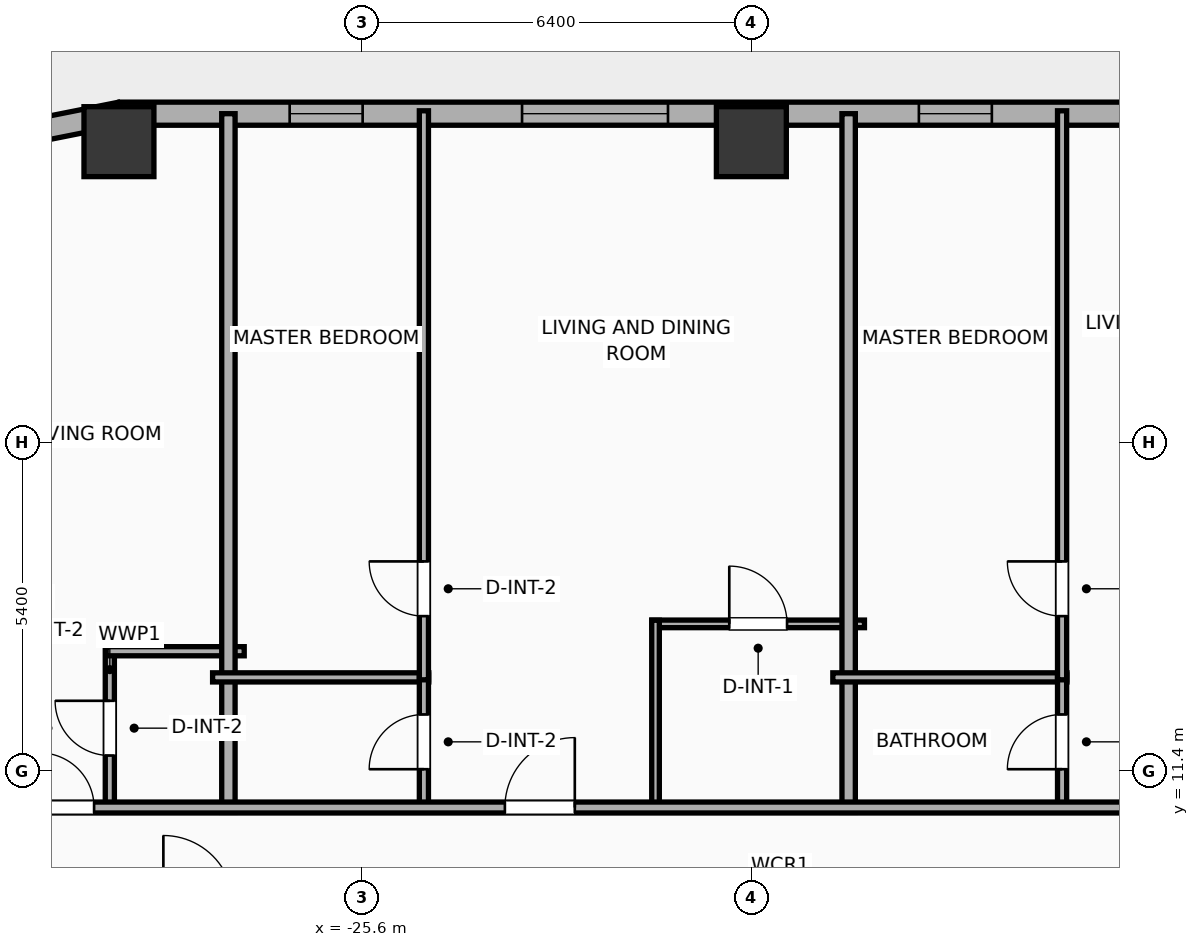
"""IFC4 building model, lengths in metres.
Left out: names, types, materials, properties, quantities, classifications, styles, units other than length and angle.
Written with IfcOpenShell. Run it as: python <this file> out.ifc"""

import sys

from ifc_helpers import new_model, si_unit, direction, frame, frame_2d, origin, origin_2d, place, context, subcontext, project, spatial, rectangle, hollow_rectangle, extrude, element, fill, save


model = new_model("IFC4")
c1 = context("Model", 3, precision=1e-05, world=origin(), true_north=direction((0.0, 1.0)))
c2 = subcontext(c1, "Body", "Model", "MODEL_VIEW")
j1 = project(units=[si_unit("LENGTHUNIT", "METRE"), si_unit("PLANEANGLEUNIT", "RADIAN")], contexts=[c1])
p1 = place(None, origin())
s1 = spatial("IfcSite", under=j1, at=p1, CompositionType="ELEMENT")
p2 = place(p1, origin())
s2 = spatial("IfcBuilding", under=s1, at=p2, CompositionType="ELEMENT")
p3 = place(p2, frame((0.0, 0.0, 53.3)))
s3 = spatial("IfcBuildingStorey", under=s2, at=p3, CompositionType="ELEMENT", Elevation=53.3)
for number, where, z_axis, x_axis in (
    (1, (-19.2, 21.75, 0.0), (0.0, 0.0, 1.0), (1.0, 0.0, 0.0)),
    (2, (-29.6, 21.75, 0.0), (0.0, 0.0, 1.0), (1.0, 0.0, 0.0)),
):
    element("IfcColumn", number, at=place(p3, frame(where, z_axis=z_axis, x_axis=x_axis)), inside=s3, PredefinedType="COLUMN", context=c2, shape_type="SweptSolid", body=[
        extrude(hollow_rectangle(XDim=1.15, YDim=1.15, WallThickness=0.04, at=origin_2d()), origin(), (0.0, 0.0, 1.0), 3.9),
    ])
p4 = place(p3, frame((-31.057, 21.917, 0.0), z_axis=(0.0, 0.0, 1.0), x_axis=(0.980786132421, 0.195086038585, 0.0)))
e3 = element("IfcWall", 3, at=p4, inside=s3, PredefinedType="ELEMENTEDWALL", context=c2, shape_type="SweptSolid", body=[
    extrude(rectangle(XDim=1.504, YDim=0.38, at=frame_2d((0.752, 0.0))), origin(), (0.0, 0.0, 1.0), 3.65),
])
p5 = place(p3, frame((-29.581, 22.21, 0.0), z_axis=(0.0, 0.0, 1.0), x_axis=(1.0, 0.0, 0.0)))
e4 = element("IfcWall", 4, at=p5, inside=s3, PredefinedType="ELEMENTEDWALL", context=c2, shape_type="SweptSolid", body=[
    extrude(rectangle(XDim=51.963, YDim=0.38, at=frame_2d((25.981, 0.0))), origin(), (0.0, 0.0, 1.0), 3.65),
])
p6 = place(p5, frame((6.61, 0.0, 0.75)))
e5 = element("IfcOpeningElement", 5, at=p6, cuts=e4, PredefinedType="OPENING", context=c2, shape_type="SweptSolid", body=[
    extrude(rectangle(XDim=2.4, YDim=2.1, at=frame_2d((1.2, 1.05))), frame((0.0, 0.2, 0.0), z_axis=(0.0, -1.0, 0.0), x_axis=(1.0, 0.0, 0.0)), (0.0, 0.0, 1.0), 0.4),
])
p7 = place(p5, frame((26.431, 0.0, 0.75)))
e6 = element("IfcOpeningElement", 6, at=p7, cuts=e4, PredefinedType="OPENING", context=c2, shape_type="SweptSolid", body=[
    extrude(rectangle(XDim=2.4, YDim=2.1, at=frame_2d((1.2, 1.05))), frame((0.0, 0.2, 0.0), z_axis=(0.0, -1.0, 0.0), x_axis=(1.0, 0.0, 0.0)), (0.0, 0.0, 1.0), 0.4),
])
p8 = place(p5, frame((43.752, 0.0, 0.75)))
e7 = element("IfcOpeningElement", 7, at=p8, cuts=e4, PredefinedType="OPENING", context=c2, shape_type="SweptSolid", body=[
    extrude(rectangle(XDim=2.4, YDim=2.1, at=frame_2d((1.2, 1.05))), frame((0.0, 0.2, 0.0), z_axis=(0.0, -1.0, 0.0), x_axis=(1.0, 0.0, 0.0)), (0.0, 0.0, 1.0), 0.4),
])
p9 = place(p5, frame((2.789, 0.0, 0.75)))
e8 = element("IfcOpeningElement", 8, at=p9, cuts=e4, PredefinedType="OPENING", context=c2, shape_type="SweptSolid", body=[
    extrude(rectangle(XDim=1.2, YDim=2.05, at=frame_2d((0.6, 1.025))), frame((0.0, 0.2, 0.0), z_axis=(0.0, -1.0, 0.0), x_axis=(1.0, 0.0, 0.0)), (0.0, 0.0, 1.0), 0.4),
])
p10 = place(p5, frame((16.831, 0.0, 0.75)))
e9 = element("IfcOpeningElement", 9, at=p10, cuts=e4, PredefinedType="OPENING", context=c2, shape_type="SweptSolid", body=[
    extrude(rectangle(XDim=1.2, YDim=2.05, at=frame_2d((0.6, 1.025))), frame((0.0, 0.2, 0.0), z_axis=(0.0, -1.0, 0.0), x_axis=(1.0, 0.0, 0.0)), (0.0, 0.0, 1.0), 0.4),
])
p11 = place(p5, frame((13.136, 0.0, 0.75)))
e10 = element("IfcOpeningElement", 10, at=p11, cuts=e4, PredefinedType="OPENING", context=c2, shape_type="SweptSolid", body=[
    extrude(rectangle(XDim=1.2, YDim=2.05, at=frame_2d((0.6, 1.025))), frame((0.0, 0.2, 0.0), z_axis=(0.0, -1.0, 0.0), x_axis=(1.0, 0.0, 0.0)), (0.0, 0.0, 1.0), 0.4),
])
p12 = place(p5, frame((21.456, 0.0, 0.75)))
e11 = element("IfcOpeningElement", 11, at=p12, cuts=e4, PredefinedType="OPENING", context=c2, shape_type="SweptSolid", body=[
    extrude(rectangle(XDim=0.52, YDim=2.05, at=frame_2d((0.26, 1.025))), frame((0.0, 0.2, 0.0), z_axis=(0.0, -1.0, 0.0), x_axis=(1.0, 0.0, 0.0)), (0.0, 0.0, 1.0), 0.4),
])
p13 = place(p5, frame((23.507, 0.0, 0.75)))
e12 = element("IfcOpeningElement", 12, at=p13, cuts=e4, PredefinedType="OPENING", context=c2, shape_type="SweptSolid", body=[
    extrude(rectangle(XDim=1.2, YDim=2.05, at=frame_2d((0.6, 1.025))), frame((0.0, 0.2, 0.0), z_axis=(0.0, -1.0, 0.0), x_axis=(1.0, 0.0, 0.0)), (0.0, 0.0, 1.0), 0.4),
])
p14 = place(p5, frame((37.494, 0.0, 0.75)))
e13 = element("IfcOpeningElement", 13, at=p14, cuts=e4, PredefinedType="OPENING", context=c2, shape_type="SweptSolid", body=[
    extrude(rectangle(XDim=1.2, YDim=2.05, at=frame_2d((0.6, 1.025))), frame((0.0, 0.2, 0.0), z_axis=(0.0, -1.0, 0.0), x_axis=(1.0, 0.0, 0.0)), (0.0, 0.0, 1.0), 0.4),
])
p15 = place(p5, frame((33.733, 0.0, 0.75)))
e14 = element("IfcOpeningElement", 14, at=p15, cuts=e4, PredefinedType="OPENING", context=c2, shape_type="SweptSolid", body=[
    extrude(rectangle(XDim=1.2, YDim=2.05, at=frame_2d((0.6, 1.025))), frame((0.0, 0.2, 0.0), z_axis=(0.0, -1.0, 0.0), x_axis=(1.0, 0.0, 0.0)), (0.0, 0.0, 1.0), 0.4),
])
p16 = place(p5, frame((42.323, 0.0, 0.75)))
e15 = element("IfcOpeningElement", 15, at=p16, cuts=e4, PredefinedType="OPENING", context=c2, shape_type="SweptSolid", body=[
    extrude(rectangle(XDim=0.52, YDim=2.05, at=frame_2d((0.26, 1.025))), frame((0.0, 0.2, 0.0), z_axis=(0.0, -1.0, 0.0), x_axis=(1.0, 0.0, 0.0)), (0.0, 0.0, 1.0), 0.4),
])
p17 = place(p5, frame((47.601, 0.0, 0.75)))
e16 = element("IfcOpeningElement", 16, at=p17, cuts=e4, PredefinedType="OPENING", context=c2, shape_type="SweptSolid", body=[
    extrude(rectangle(XDim=1.2, YDim=2.05, at=frame_2d((0.6, 1.025))), frame((0.0, 0.2, 0.0), z_axis=(0.0, -1.0, 0.0), x_axis=(1.0, 0.0, 0.0)), (0.0, 0.0, 1.0), 0.4),
])
p18 = place(p5, frame((49.681, 0.0, 0.75)))
e17 = element("IfcOpeningElement", 17, at=p18, cuts=e4, PredefinedType="OPENING", context=c2, shape_type="SweptSolid", body=[
    extrude(rectangle(XDim=1.2, YDim=2.05, at=frame_2d((0.6, 1.025))), frame((0.0, 0.2, 0.0), z_axis=(0.0, -1.0, 0.0), x_axis=(1.0, 0.0, 0.0)), (0.0, 0.0, 1.0), 0.4),
])
p19 = place(p3, frame((-29.75, 10.78, 0.0), z_axis=(0.0, 0.0, 1.0), x_axis=(0.0, 1.0, 0.0)))
e18 = element("IfcWall", 18, at=p19, inside=s3, PredefinedType="PLUMBINGWALL", context=c2, shape_type="SweptSolid", body=[
    extrude(rectangle(XDim=2.65, YDim=0.15, at=frame_2d((1.325, 0.0))), origin(), (0.0, 0.0, 1.0), 3.65),
])
p20 = place(p19, frame((0.875, 0.0, 0.0)))
e19 = element("IfcOpeningElement", 19, at=p20, cuts=e18, PredefinedType="OPENING", context=c2, shape_type="SweptSolid", body=[
    extrude(rectangle(XDim=0.9, YDim=2.05, at=frame_2d((0.45, 1.025))), frame((0.0, 0.085, 0.0), z_axis=(0.0, -1.0, 0.0), x_axis=(1.0, 0.0, 0.0)), (0.0, 0.0, 1.0), 0.17),
])
p21 = place(p3, frame((-29.81, 13.37, 0.0), z_axis=(0.0, 0.0, 1.0), x_axis=(1.0, 0.0, 0.0)))
e20 = element("IfcWall", 20, at=p21, inside=s3, PredefinedType="PLUMBINGWALL", context=c2, shape_type="SweptSolid", body=[
    extrude(rectangle(XDim=2.27, YDim=0.15, at=frame_2d((1.135, 0.0))), origin(), (0.0, 0.0, 1.0), 3.65),
])
p22 = place(p3, frame((-27.8, 10.72, 0.0), z_axis=(0.0, 0.0, 1.0), x_axis=(0.0, 1.0, 0.0)))
e21 = element("IfcWall", 21, at=p22, inside=s3, PredefinedType="PARTITIONING", context=c2, shape_type="SweptSolid", body=[
    extrude(rectangle(XDim=11.49, YDim=0.22, at=frame_2d((5.745, 0.0))), origin(), (0.0, 0.0, 1.0), 3.65),
])
p23 = place(p3, frame((-28.06, 12.94, 0.0), z_axis=(0.0, 0.0, 1.0), x_axis=(1.0, 0.0, 0.0)))
e22 = element("IfcWall", 22, at=p23, inside=s3, PredefinedType="PLUMBINGWALL", context=c2, shape_type="SweptSolid", body=[
    extrude(rectangle(XDim=3.555, YDim=0.15, at=frame_2d((1.778, 0.0))), origin(), (0.0, 0.0, 1.0), 3.65),
])
p24 = place(p3, frame((-24.585, 10.78, 0.0), z_axis=(0.0, 0.0, 1.0), x_axis=(0.0, 1.0, 0.0)))
e23 = element("IfcWall", 23, at=p24, inside=s3, PredefinedType="PLUMBINGWALL", context=c2, shape_type="SweptSolid", body=[
    extrude(rectangle(XDim=2.2, YDim=0.15, at=frame_2d((1.1, 0.0))), origin(), (0.0, 0.0, 1.0), 3.65),
])
p25 = place(p24, frame((0.65, 0.0, 0.0)))
e24 = element("IfcOpeningElement", 24, at=p25, cuts=e23, PredefinedType="OPENING", context=c2, shape_type="SweptSolid", body=[
    extrude(rectangle(XDim=0.9, YDim=2.05, at=frame_2d((0.45, 1.025))), frame((0.0, 0.085, 0.0), z_axis=(0.0, -1.0, 0.0), x_axis=(1.0, 0.0, 0.0)), (0.0, 0.0, 1.0), 0.17),
])
p26 = place(p3, frame((-24.585, 12.9, 0.0), z_axis=(0.0, 0.0, 1.0), x_axis=(0.0, 1.0, 0.0)))
e25 = element("IfcWall", 25, at=p26, inside=s3, PredefinedType="PLUMBINGWALL", context=c2, shape_type="SweptSolid", body=[
    extrude(rectangle(XDim=9.358, YDim=0.15, at=frame_2d((4.679, 0.0))), origin(), (0.0, 0.0, 1.0), 3.65),
])
p27 = place(p26, frame((1.047, 0.0, 0.0)))
e26 = element("IfcOpeningElement", 26, at=p27, cuts=e25, PredefinedType="OPENING", context=c2, shape_type="SweptSolid", body=[
    extrude(rectangle(XDim=0.9, YDim=2.05, at=frame_2d((0.45, 1.025))), frame((0.0, 0.085, 0.0), z_axis=(0.0, -1.0, 0.0), x_axis=(1.0, 0.0, 0.0)), (0.0, 0.0, 1.0), 0.17),
])
p28 = place(p3, frame((-20.836, 13.82, 0.0), z_axis=(0.0, 0.0, 1.0), x_axis=(1.0, 0.0, 0.0)))
e27 = element("IfcWall", 27, at=p28, inside=s3, PredefinedType="PARTITIONING", context=c2, shape_type="SweptSolid", body=[
    extrude(rectangle(XDim=3.496, YDim=0.125, at=frame_2d((1.748, 0.0))), origin(), (0.0, 0.0, 1.0), 3.65),
])
p29 = place(p28, frame((1.273, 0.0, 0.0)))
e28 = element("IfcOpeningElement", 28, at=p29, cuts=e27, PredefinedType="OPENING", context=c2, shape_type="SweptSolid", body=[
    extrude(rectangle(XDim=0.95, YDim=2.05, at=frame_2d((0.475, 1.025))), frame((0.0, 0.073, 0.0), z_axis=(0.0, -1.0, 0.0), x_axis=(1.0, 0.0, 0.0)), (0.0, 0.0, 1.0), 0.145),
])
p30 = place(p3, frame((-20.776, 10.78, 0.0), z_axis=(0.0, 0.0, 1.0), x_axis=(0.0, 1.0, 0.0)))
e29 = element("IfcWall", 29, at=p30, inside=s3, PredefinedType="PARTITIONING", context=c2, shape_type="SweptSolid", body=[
    extrude(rectangle(XDim=3.1, YDim=0.125, at=frame_2d((1.55, 0.0))), origin(), (0.0, 0.0, 1.0), 3.65),
])
p31 = place(p3, frame((-17.6, 10.72, 0.0), z_axis=(0.0, 0.0, 1.0), x_axis=(0.0, 1.0, 0.0)))
e30 = element("IfcWall", 30, at=p31, inside=s3, PredefinedType="PARTITIONING", context=c2, shape_type="SweptSolid", body=[
    extrude(rectangle(XDim=11.49, YDim=0.22, at=frame_2d((5.745, 0.0))), origin(), (0.0, 0.0, 1.0), 3.65),
])
p32 = place(p3, frame((-17.86, 12.94, 0.0), z_axis=(0.0, 0.0, 1.0), x_axis=(1.0, 0.0, 0.0)))
e31 = element("IfcWall", 31, at=p32, inside=s3, PredefinedType="PLUMBINGWALL", context=c2, shape_type="SweptSolid", body=[
    extrude(rectangle(XDim=3.85, YDim=0.15, at=frame_2d((1.925, 0.0))), origin(), (0.0, 0.0, 1.0), 3.65),
])
p33 = place(p3, frame((-14.09, 10.78, 0.0), z_axis=(0.0, 0.0, 1.0), x_axis=(0.0, 1.0, 0.0)))
e32 = element("IfcWall", 32, at=p33, inside=s3, PredefinedType="PLUMBINGWALL", context=c2, shape_type="SweptSolid", body=[
    extrude(rectangle(XDim=2.2, YDim=0.15, at=frame_2d((1.1, 0.0))), origin(), (0.0, 0.0, 1.0), 3.65),
])
p34 = place(p33, frame((0.65, 0.0, 0.0)))
e33 = element("IfcOpeningElement", 33, at=p34, cuts=e32, PredefinedType="OPENING", context=c2, shape_type="SweptSolid", body=[
    extrude(rectangle(XDim=0.9, YDim=2.05, at=frame_2d((0.45, 1.025))), frame((0.0, 0.085, 0.0), z_axis=(0.0, -1.0, 0.0), x_axis=(1.0, 0.0, 0.0)), (0.0, 0.0, 1.0), 0.17),
])
p35 = place(p3, frame((-14.09, 12.9, 0.0), z_axis=(0.0, 0.0, 1.0), x_axis=(0.0, 1.0, 0.0)))
e34 = element("IfcWall", 34, at=p35, inside=s3, PredefinedType="PLUMBINGWALL", context=c2, shape_type="SweptSolid", body=[
    extrude(rectangle(XDim=9.358, YDim=0.15, at=frame_2d((4.679, 0.0))), origin(), (0.0, 0.0, 1.0), 3.65),
])
p36 = place(p35, frame((1.047, 0.0, 0.0)))
e35 = element("IfcOpeningElement", 35, at=p36, cuts=e34, PredefinedType="OPENING", context=c2, shape_type="SweptSolid", body=[
    extrude(rectangle(XDim=0.9, YDim=2.05, at=frame_2d((0.45, 1.025))), frame((0.0, 0.085, 0.0), z_axis=(0.0, -1.0, 0.0), x_axis=(1.0, 0.0, 0.0)), (0.0, 0.0, 1.0), 0.17),
])
p37 = place(p3, frame((-33.41, 10.8, 0.0), z_axis=(0.0, 0.0, 1.0), x_axis=(1.0, 0.0, 0.0)))
e36 = element("IfcWall", 36, at=p37, inside=s3, PredefinedType="PARTITIONING", context=c2, shape_type="SweptSolid", body=[
    extrude(rectangle(XDim=59.62, YDim=0.18, at=frame_2d((29.81, 0.0))), origin(), (0.0, 0.0, 1.0), 3.65),
])
p38 = place(p37, frame((2.501, 0.0, 0.0)))
e37 = element("IfcOpeningElement", 37, at=p38, cuts=e36, PredefinedType="OPENING", context=c2, shape_type="SweptSolid", body=[
    extrude(rectangle(XDim=0.9, YDim=2.05, at=frame_2d((0.45, 1.025))), frame((0.0, 0.1, 0.0), z_axis=(0.0, -1.0, 0.0), x_axis=(1.0, 0.0, 0.0)), (0.0, 0.0, 1.0), 0.2),
])
p39 = place(p37, frame((10.156, 0.0, 0.0)))
e38 = element("IfcOpeningElement", 38, at=p39, cuts=e36, PredefinedType="OPENING", context=c2, shape_type="SweptSolid", body=[
    extrude(rectangle(XDim=1.15, YDim=2.05, at=frame_2d((0.575, 1.025))), frame((0.0, 0.1, 0.0), z_axis=(0.0, -1.0, 0.0), x_axis=(1.0, 0.0, 0.0)), (0.0, 0.0, 1.0), 0.2),
])
p40 = place(p37, frame((20.686, 0.0, 0.0)))
e39 = element("IfcOpeningElement", 39, at=p40, cuts=e36, PredefinedType="OPENING", context=c2, shape_type="SweptSolid", body=[
    extrude(rectangle(XDim=1.15, YDim=2.05, at=frame_2d((0.575, 1.025))), frame((0.0, 0.1, 0.0), z_axis=(0.0, -1.0, 0.0), x_axis=(1.0, 0.0, 0.0)), (0.0, 0.0, 1.0), 0.2),
])
p41 = place(p37, frame((30.982, 0.0, 0.0)))
e40 = element("IfcOpeningElement", 40, at=p41, cuts=e36, PredefinedType="OPENING", context=c2, shape_type="SweptSolid", body=[
    extrude(rectangle(XDim=1.15, YDim=2.05, at=frame_2d((0.575, 1.025))), frame((0.0, 0.1, 0.0), z_axis=(0.0, -1.0, 0.0), x_axis=(1.0, 0.0, 0.0)), (0.0, 0.0, 1.0), 0.2),
])
p42 = place(p37, frame((41.35, 0.0, 0.0)))
e41 = element("IfcOpeningElement", 41, at=p42, cuts=e36, PredefinedType="OPENING", context=c2, shape_type="SweptSolid", body=[
    extrude(rectangle(XDim=1.15, YDim=2.05, at=frame_2d((0.575, 1.025))), frame((0.0, 0.1, 0.0), z_axis=(0.0, -1.0, 0.0), x_axis=(1.0, 0.0, 0.0)), (0.0, 0.0, 1.0), 0.2),
])
p43 = place(p37, frame((48.331, 0.0, 0.0)))
e42 = element("IfcOpeningElement", 42, at=p43, cuts=e36, PredefinedType="OPENING", context=c2, shape_type="SweptSolid", body=[
    extrude(rectangle(XDim=1.15, YDim=2.05, at=frame_2d((0.575, 1.025))), frame((0.0, 0.1, 0.0), z_axis=(0.0, -1.0, 0.0), x_axis=(1.0, 0.0, 0.0)), (0.0, 0.0, 1.0), 0.2),
])
p44 = place(p37, frame((56.177, 0.0, 0.0)))
e43 = element("IfcOpeningElement", 43, at=p44, cuts=e36, PredefinedType="OPENING", context=c2, shape_type="SweptSolid", body=[
    extrude(rectangle(XDim=0.9, YDim=2.05, at=frame_2d((0.45, 1.025))), frame((0.0, 0.1, 0.0), z_axis=(0.0, -1.0, 0.0), x_axis=(1.0, 0.0, 0.0)), (0.0, 0.0, 1.0), 0.2),
])
p45 = place(p6, origin())
e44 = element("IfcWindow", 44, at=p45, inside=s3, PartitioningType="SINGLE_PANEL", PredefinedType="WINDOW", context=c2, shape_type="SweptSolid", body=[
    extrude(rectangle(XDim=2.4, YDim=2.1, at=frame_2d((1.2, 1.05))), frame((0.0, 0.03, 0.0), z_axis=(0.0, -1.0, 0.0), x_axis=(1.0, 0.0, 0.0)), (0.0, 0.0, 1.0), 0.06),
])
fill(e5, e44)
p46 = place(p9, origin())
e45 = element("IfcWindow", 45, at=p46, inside=s3, PartitioningType="SINGLE_PANEL", PredefinedType="WINDOW", context=c2, shape_type="SweptSolid", body=[
    extrude(rectangle(XDim=1.2, YDim=2.05, at=frame_2d((0.6, 1.025))), frame((0.0, 0.03, 0.0), z_axis=(0.0, -1.0, 0.0), x_axis=(1.0, 0.0, 0.0)), (0.0, 0.0, 1.0), 0.06),
])
fill(e8, e45)
p47 = place(p11, origin())
e46 = element("IfcWindow", 46, at=p47, inside=s3, PartitioningType="SINGLE_PANEL", PredefinedType="WINDOW", context=c2, shape_type="SweptSolid", body=[
    extrude(rectangle(XDim=1.2, YDim=2.05, at=frame_2d((0.6, 1.025))), frame((0.0, 0.03, 0.0), z_axis=(0.0, -1.0, 0.0), x_axis=(1.0, 0.0, 0.0)), (0.0, 0.0, 1.0), 0.06),
])
fill(e10, e46)
p48 = place(p20, origin())
e47 = element("IfcDoor", 47, at=p48, inside=s3, OperationType="SINGLE_SWING_RIGHT", PredefinedType="DOOR", context=c2, shape_type="SweptSolid", body=[
    extrude(rectangle(XDim=0.9, YDim=2.05, at=frame_2d((0.45, 1.025))), frame((0.0, 0.025, 0.0), z_axis=(0.0, -1.0, 0.0), x_axis=(1.0, 0.0, 0.0)), (0.0, 0.0, 1.0), 0.05),
])
fill(e19, e47)
p49 = place(p25, origin())
e48 = element("IfcDoor", 48, at=p49, inside=s3, OperationType="SINGLE_SWING_LEFT", PredefinedType="DOOR", context=c2, shape_type="SweptSolid", body=[
    extrude(rectangle(XDim=0.9, YDim=2.05, at=frame_2d((0.45, 1.025))), frame((0.0, 0.025, 0.0), z_axis=(0.0, -1.0, 0.0), x_axis=(1.0, 0.0, 0.0)), (0.0, 0.0, 1.0), 0.05),
])
fill(e24, e48)
p50 = place(p27, origin())
e49 = element("IfcDoor", 49, at=p50, inside=s3, OperationType="SINGLE_SWING_RIGHT", PredefinedType="DOOR", context=c2, shape_type="SweptSolid", body=[
    extrude(rectangle(XDim=0.9, YDim=2.05, at=frame_2d((0.45, 1.025))), frame((0.0, 0.025, 0.0), z_axis=(0.0, -1.0, 0.0), x_axis=(1.0, 0.0, 0.0)), (0.0, 0.0, 1.0), 0.05),
])
fill(e26, e49)
p51 = place(p29, origin())
e50 = element("IfcDoor", 50, at=p51, inside=s3, OperationType="SINGLE_SWING_LEFT", PredefinedType="DOOR", context=c2, shape_type="SweptSolid", body=[
    extrude(rectangle(XDim=0.95, YDim=2.05, at=frame_2d((0.475, 1.025))), frame((0.0, 0.025, 0.0), z_axis=(0.0, -1.0, 0.0), x_axis=(1.0, 0.0, 0.0)), (0.0, 0.0, 1.0), 0.05),
])
fill(e28, e50)
p52 = place(p34, origin())
e51 = element("IfcDoor", 51, at=p52, inside=s3, OperationType="SINGLE_SWING_LEFT", PredefinedType="DOOR", context=c2, shape_type="SweptSolid", body=[
    extrude(rectangle(XDim=0.9, YDim=2.05, at=frame_2d((0.45, 1.025))), frame((0.0, 0.025, 0.0), z_axis=(0.0, -1.0, 0.0), x_axis=(1.0, 0.0, 0.0)), (0.0, 0.0, 1.0), 0.05),
])
fill(e33, e51)
p53 = place(p36, origin())
e52 = element("IfcDoor", 52, at=p53, inside=s3, OperationType="SINGLE_SWING_RIGHT", PredefinedType="DOOR", context=c2, shape_type="SweptSolid", body=[
    extrude(rectangle(XDim=0.9, YDim=2.05, at=frame_2d((0.45, 1.025))), frame((0.0, 0.025, 0.0), z_axis=(0.0, -1.0, 0.0), x_axis=(1.0, 0.0, 0.0)), (0.0, 0.0, 1.0), 0.05),
])
fill(e35, e52)
p54 = place(p38, origin())
e53 = element("IfcDoor", 53, at=p54, inside=s3, OperationType="SINGLE_SWING_LEFT", PredefinedType="DOOR", context=c2, shape_type="SweptSolid", body=[
    extrude(rectangle(XDim=0.9, YDim=2.05, at=frame_2d((0.45, 1.025))), frame((0.0, 0.025, 0.0), z_axis=(0.0, -1.0, 0.0), x_axis=(1.0, 0.0, 0.0)), (0.0, 0.0, 1.0), 0.05),
])
fill(e37, e53)
p55 = place(p39, origin())
e54 = element("IfcDoor", 54, at=p55, inside=s3, OperationType="SINGLE_SWING_RIGHT", PredefinedType="DOOR", context=c2, shape_type="SweptSolid", body=[
    extrude(rectangle(XDim=1.15, YDim=2.05, at=frame_2d((0.575, 1.025))), frame((0.0, 0.025, 0.0), z_axis=(0.0, -1.0, 0.0), x_axis=(1.0, 0.0, 0.0)), (0.0, 0.0, 1.0), 0.05),
])
fill(e38, e54)
save(model, sys.argv[1])
